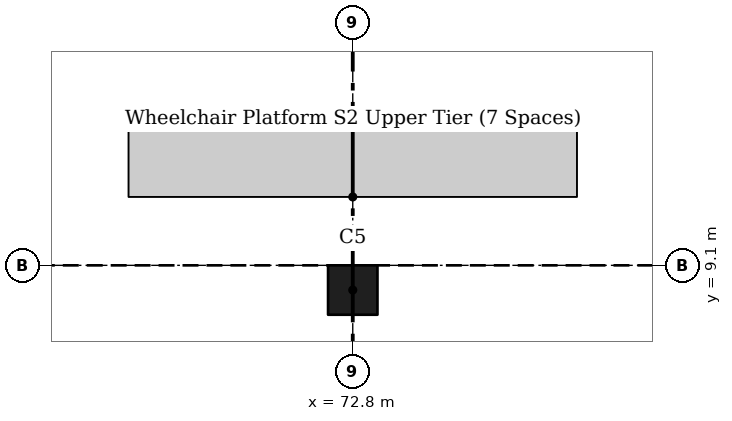
"""IFC4 building model, lengths in metres.
Left out: names, types, materials, properties, quantities, classifications, styles, units other than length and angle.
Written with IfcOpenShell. Run it as: python <this file> out.ifc"""

import sys

from ifc_helpers import new_model, si_unit, direction, frame, origin, origin_2d, place, context, subcontext, project, spatial, rectangle, extrude, element, save


model = new_model("IFC4")
c1 = context("Model", 3, precision=1e-05, world=origin(), true_north=direction((0.0, 1.0)))
c2 = subcontext(c1, "Body", "Model", "MODEL_VIEW")
j1 = project(units=[si_unit("LENGTHUNIT", "METRE"), si_unit("PLANEANGLEUNIT", "RADIAN")], contexts=[c1])
p1 = place(None, origin())
s1 = spatial("IfcSite", under=j1, at=p1, CompositionType="ELEMENT")
p2 = place(p1, origin())
s2 = spatial("IfcBuilding", under=s1, at=p2, CompositionType="ELEMENT")
p3 = place(p2, frame((0.0, 0.0, 24.57)))
s3 = spatial("IfcBuildingStorey", under=s2, at=p3, CompositionType="ELEMENT", Elevation=24.57)
p4 = place(p3, frame((72.8, 8.775, 0.0), z_axis=(0.0, 0.0, 1.0), x_axis=(1.0, 0.0, 0.0)))
e1 = element("IfcColumn", 1, at=p4, inside=s3, PredefinedType="COLUMN", context=c2, shape_type="SweptSolid", body=[
    extrude(rectangle(XDim=0.65, YDim=0.65, at=origin_2d()), origin(), (0.0, 0.0, 1.0), 4.55),
])
save(model, sys.argv[1])
